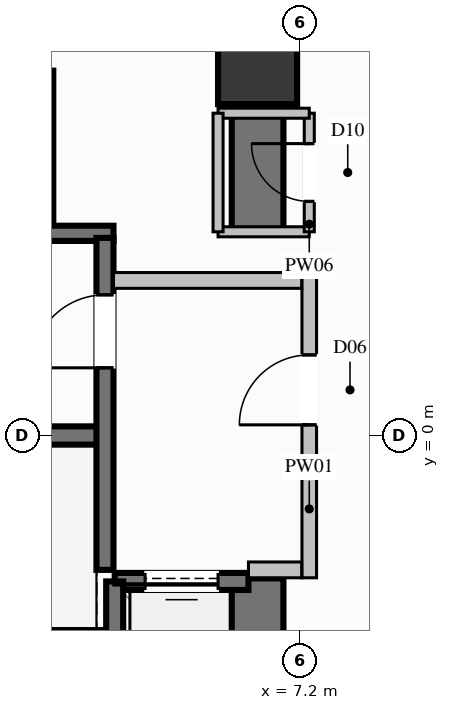
"""IFC4 building model, lengths in metres.
Left out: names, types, materials, properties, quantities, classifications, styles, units other than length and angle.
Written with IfcOpenShell. Run it as: python <this file> out.ifc"""

import sys

from ifc_helpers import new_model, si_unit, direction, frame, frame_2d, origin, origin_2d, place, context, subcontext, project, spatial, rectangle, extrude, element, fill, save


model = new_model("IFC4")
c1 = context("Model", 3, precision=1e-05, world=origin(), true_north=direction((0.0, 1.0)))
c2 = subcontext(c1, "Body", "Model", "MODEL_VIEW")
j1 = project(units=[si_unit("LENGTHUNIT", "METRE"), si_unit("PLANEANGLEUNIT", "RADIAN")], contexts=[c1])
p1 = place(None, origin())
s1 = spatial("IfcSite", under=j1, at=p1, CompositionType="ELEMENT")
p2 = place(p1, origin())
s2 = spatial("IfcBuilding", under=s1, at=p2, CompositionType="ELEMENT")
p3 = place(p2, frame((0.0, 0.0, 12.6)))
s3 = spatial("IfcBuildingStorey", under=s2, at=p3, CompositionType="ELEMENT", Elevation=12.6)
p4 = place(p3, frame((6.5, 6.1, 0.0), z_axis=(0.0, 0.0, 1.0), x_axis=(1.0, 0.0, 0.0)))
e1 = element("IfcColumn", 1, at=p4, inside=s3, PredefinedType="COLUMN", context=c2, shape_type="SweptSolid", body=[
    extrude(rectangle(XDim=1.3, YDim=1.3, at=origin_2d()), origin(), (0.0, 0.0, 1.0), 6.0),
])
p5 = place(p3, frame((-3.99, 0.0, 0.0), z_axis=(0.0, 0.0, 1.0), x_axis=(1.0, 0.0, 0.0)))
e2 = element("IfcWall", 2, at=p5, inside=s3, PredefinedType="SHEAR", context=c2, shape_type="SweptSolid", body=[
    extrude(rectangle(XDim=7.98, YDim=0.3, at=frame_2d((3.99, 0.0))), origin(), (0.0, 0.0, 1.0), 6.0),
])
for number, where, z_axis, x_axis in (
    (3, (-4.13, -3.325, 0.0), (0.0, 0.0, 1.0), (1.0, 0.0, 0.0)),
    (4, (-4.13, 3.325, 0.0), (0.0, 0.0, 1.0), (1.0, 0.0, 0.0)),
):
    element("IfcWall", number, at=place(p3, frame(where, z_axis=z_axis, x_axis=x_axis)), inside=s3, PredefinedType="SOLIDWALL", context=c2, shape_type="SweptSolid", body=[
        extrude(rectangle(XDim=8.26, YDim=0.25, at=frame_2d((4.13, 0.0))), origin(), (0.0, 0.0, 1.0), 6.0),
    ])
p6 = place(p3, frame((5.85, 6.1, 0.0), z_axis=(0.0, 0.0, 1.0), x_axis=(1.0, 0.0, 0.0)))
e5 = element("IfcWall", 5, at=p6, inside=s3, PredefinedType="SHEAR", context=c2, shape_type="SweptSolid", body=[
    extrude(rectangle(XDim=0.225, YDim=0.85, at=frame_2d((0.112, 0.0))), origin(), (0.0, 0.0, 1.0), 6.0),
])
p7 = place(p3, frame((6.5, -6.525, 0.0), z_axis=(0.0, 0.0, 1.0), x_axis=(0.0, 1.0, 0.0)))
e6 = element("IfcWall", 6, at=p7, inside=s3, PredefinedType="SHEAR", context=c2, shape_type="SweptSolid", body=[
    extrude(rectangle(XDim=4.175, YDim=0.85, at=frame_2d((2.087, 0.0))), origin(), (0.0, 0.0, 1.0), 6.0),
])
p8 = place(p3, frame((6.5, 3.35, 0.0), z_axis=(0.0, 0.0, 1.0), x_axis=(0.0, 1.0, 0.0)))
e7 = element("IfcWall", 7, at=p8, inside=s3, PredefinedType="SHEAR", context=c2, shape_type="SweptSolid", body=[
    extrude(rectangle(XDim=3.175, YDim=0.85, at=frame_2d((1.587, 0.0))), origin(), (0.0, 0.0, 1.0), 6.0),
])
p9 = place(p3, frame((3.0, 3.5, 0.0), z_axis=(0.0, 0.0, 1.0), x_axis=(0.0, 1.0, 0.0)))
e8 = element("IfcWall", 8, at=p9, inside=s3, PredefinedType="SOLIDWALL", context=c2, shape_type="SweptSolid", body=[
    extrude(rectangle(XDim=2.5, YDim=0.28, at=frame_2d((1.25, 0.0))), origin(), (0.0, 0.0, 1.0), 5.64),
])
p10 = place(p3, frame((6.35, -2.4, 0.0), z_axis=(0.0, 0.0, 1.0), x_axis=(-1.0, 0.0, 0.0)))
e9 = element("IfcWall", 9, at=p10, inside=s3, PredefinedType="SOLIDWALL", context=c2, shape_type="SweptSolid", body=[
    extrude(rectangle(XDim=2.2, YDim=0.28, at=frame_2d((1.1, 0.0))), origin(), (0.0, 0.0, 1.0), 5.64),
])
p11 = place(p10, frame((0.5, 0.0, 0.0)))
e10 = element("IfcOpeningElement", 10, at=p11, cuts=e9, PredefinedType="OPENING", context=c2, shape_type="SweptSolid", body=[
    extrude(rectangle(XDim=1.2, YDim=2.2, at=frame_2d((0.6, 1.1))), frame((0.0, 0.15, 0.0), z_axis=(0.0, -1.0, 0.0), x_axis=(1.0, 0.0, 0.0)), (0.0, 0.0, 1.0), 0.3),
])
p12 = place(p3, frame((4.15, -2.4, 0.0), z_axis=(0.0, 0.0, 1.0), x_axis=(0.0, -1.0, 0.0)))
e11 = element("IfcWall", 11, at=p12, inside=s3, PredefinedType="SOLIDWALL", context=c2, shape_type="SweptSolid", body=[
    extrude(rectangle(XDim=2.7, YDim=0.28, at=frame_2d((1.35, 0.0))), origin(), (0.0, 0.0, 1.0), 5.64),
])
p13 = place(p3, frame((3.99, -2.21, 0.0), z_axis=(0.0, 0.0, 1.0), x_axis=(0.0, 1.0, 0.0)))
e12 = element("IfcWall", 12, at=p13, inside=s3, PredefinedType="SOLIDWALL", context=c2, shape_type="SweptSolid", body=[
    extrude(rectangle(XDim=5.46, YDim=0.28, at=frame_2d((2.73, 0.0))), origin(), (0.0, 0.0, 1.0), 5.64),
])
p14 = place(p13, frame((3.323, 0.0, 0.0)))
e13 = element("IfcOpeningElement", 13, at=p14, cuts=e12, PredefinedType="OPENING", context=c2, shape_type="SweptSolid", body=[
    extrude(rectangle(XDim=1.2, YDim=2.2, at=frame_2d((0.6, 1.1))), frame((0.0, 0.15, 0.0), z_axis=(0.0, -1.0, 0.0), x_axis=(1.0, 0.0, 0.0)), (0.0, 0.0, 1.0), 0.3),
])
p15 = place(p3, frame((7.35, -2.34, 0.0), z_axis=(0.0, 0.0, 1.0), x_axis=(0.0, 1.0, 0.0)))
e14 = element("IfcWall", 14, at=p15, inside=s3, PredefinedType="PARTITIONING", context=c2, shape_type="SweptSolid", body=[
    extrude(rectangle(XDim=5.02, YDim=0.24, at=frame_2d((2.51, 0.0))), origin(), (0.0, 0.0, 1.0), 4.525),
])
p16 = place(p15, frame((2.515, 0.0, 0.0)))
e15 = element("IfcOpeningElement", 15, at=p16, cuts=e14, PredefinedType="OPENING", context=c2, shape_type="SweptSolid", body=[
    extrude(rectangle(XDim=1.15, YDim=2.2, at=frame_2d((0.575, 1.1))), frame((0.0, 0.13, 0.0), z_axis=(0.0, -1.0, 0.0), x_axis=(1.0, 0.0, 0.0)), (0.0, 0.0, 1.0), 0.26),
])
p17 = place(p3, frame((6.35, -2.21, 0.0), z_axis=(0.0, 0.0, 1.0), x_axis=(1.0, 0.0, 0.0)))
e16 = element("IfcWall", 16, at=p17, inside=s3, PredefinedType="PARTITIONING", context=c2, shape_type="SweptSolid", body=[
    extrude(rectangle(XDim=0.875, YDim=0.26, at=frame_2d((0.438, 0.0))), origin(), (0.0, 0.0, 1.0), 5.64),
])
p18 = place(p3, frame((4.13, 2.55, 0.0), z_axis=(0.0, 0.0, 1.0), x_axis=(1.0, 0.0, 0.0)))
e17 = element("IfcWall", 17, at=p18, inside=s3, PredefinedType="PARTITIONING", context=c2, shape_type="SweptSolid", body=[
    extrude(rectangle(XDim=3.095, YDim=0.26, at=frame_2d((1.548, 0.0))), origin(), (0.0, 0.0, 1.0), 5.64),
])
p19 = place(p3, frame((5.85, 3.35, 0.0), z_axis=(0.0, 0.0, 1.0), x_axis=(1.0, 0.0, 0.0)))
e18 = element("IfcWall", 18, at=p19, inside=s3, PredefinedType="PARTITIONING", context=c2, shape_type="SweptSolid", body=[
    extrude(rectangle(XDim=1.5, YDim=0.165, at=frame_2d((0.75, 0.0))), origin(), (0.0, 0.0, 1.0), 5.64),
])
p20 = place(p3, frame((7.35, 3.35, 0.0), z_axis=(0.0, 0.0, 1.0), x_axis=(0.0, 1.0, 0.0)))
e19 = element("IfcWall", 19, at=p20, inside=s3, PredefinedType="PARTITIONING", context=c2, shape_type="SweptSolid", body=[
    extrude(rectangle(XDim=1.95, YDim=0.165, at=frame_2d((0.975, 0.0))), origin(), (0.0, 0.0, 1.0), 4.525),
])
p21 = place(p20, frame((0.5, 0.0, 0.0)))
e20 = element("IfcOpeningElement", 20, at=p21, cuts=e19, PredefinedType="OPENING", context=c2, shape_type="SweptSolid", body=[
    extrude(rectangle(XDim=0.95, YDim=2.1, at=frame_2d((0.475, 1.05))), frame((0.0, 0.093, 0.0), z_axis=(0.0, -1.0, 0.0), x_axis=(1.0, 0.0, 0.0)), (0.0, 0.0, 1.0), 0.185),
])
p22 = place(p3, frame((7.35, 5.3, 0.0), z_axis=(0.0, 0.0, 1.0), x_axis=(-1.0, 0.0, 0.0)))
e21 = element("IfcWall", 21, at=p22, inside=s3, PredefinedType="PARTITIONING", context=c2, shape_type="SweptSolid", body=[
    extrude(rectangle(XDim=1.5, YDim=0.165, at=frame_2d((0.75, 0.0))), origin(), (0.0, 0.0, 1.0), 3.825),
])
p23 = place(p3, frame((5.85, 5.3, 0.0), z_axis=(0.0, 0.0, 1.0), x_axis=(0.0, -1.0, 0.0)))
e22 = element("IfcWall", 22, at=p23, inside=s3, PredefinedType="PARTITIONING", context=c2, shape_type="SweptSolid", body=[
    extrude(rectangle(XDim=1.95, YDim=0.165, at=frame_2d((0.975, 0.0))), origin(), (0.0, 0.0, 1.0), 4.525),
])
p24 = place(p11, origin())
e23 = element("IfcDoor", 23, at=p24, inside=s3, OperationType="SLIDING_TO_LEFT", PredefinedType="DOOR", context=c2, shape_type="SweptSolid", body=[
    extrude(rectangle(XDim=1.2, YDim=2.2, at=frame_2d((0.6, 1.1))), frame((0.0, 0.025, 0.0), z_axis=(0.0, -1.0, 0.0), x_axis=(1.0, 0.0, 0.0)), (0.0, 0.0, 1.0), 0.05),
])
fill(e10, e23)
p25 = place(p14, origin())
e24 = element("IfcDoor", 24, at=p25, inside=s3, OperationType="SINGLE_SWING_LEFT", PredefinedType="DOOR", context=c2, shape_type="SweptSolid", body=[
    extrude(rectangle(XDim=1.2, YDim=2.2, at=frame_2d((0.6, 1.1))), frame((0.0, 0.025, 0.0), z_axis=(0.0, -1.0, 0.0), x_axis=(1.0, 0.0, 0.0)), (0.0, 0.0, 1.0), 0.05),
])
fill(e13, e24)
p26 = place(p16, origin())
e25 = element("IfcDoor", 25, at=p26, inside=s3, OperationType="SINGLE_SWING_LEFT", PredefinedType="DOOR", context=c2, shape_type="SweptSolid", body=[
    extrude(rectangle(XDim=1.15, YDim=2.2, at=frame_2d((0.575, 1.1))), frame((0.0, 0.025, 0.0), z_axis=(0.0, -1.0, 0.0), x_axis=(1.0, 0.0, 0.0)), (0.0, 0.0, 1.0), 0.05),
])
fill(e15, e25)
p27 = place(p21, origin())
e26 = element("IfcDoor", 26, at=p27, inside=s3, OperationType="SINGLE_SWING_RIGHT", PredefinedType="DOOR", context=c2, shape_type="SweptSolid", body=[
    extrude(rectangle(XDim=0.95, YDim=2.1, at=frame_2d((0.475, 1.05))), frame((0.0, 0.025, 0.0), z_axis=(0.0, -1.0, 0.0), x_axis=(1.0, 0.0, 0.0)), (0.0, 0.0, 1.0), 0.05),
])
fill(e20, e26)
save(model, sys.argv[1])
